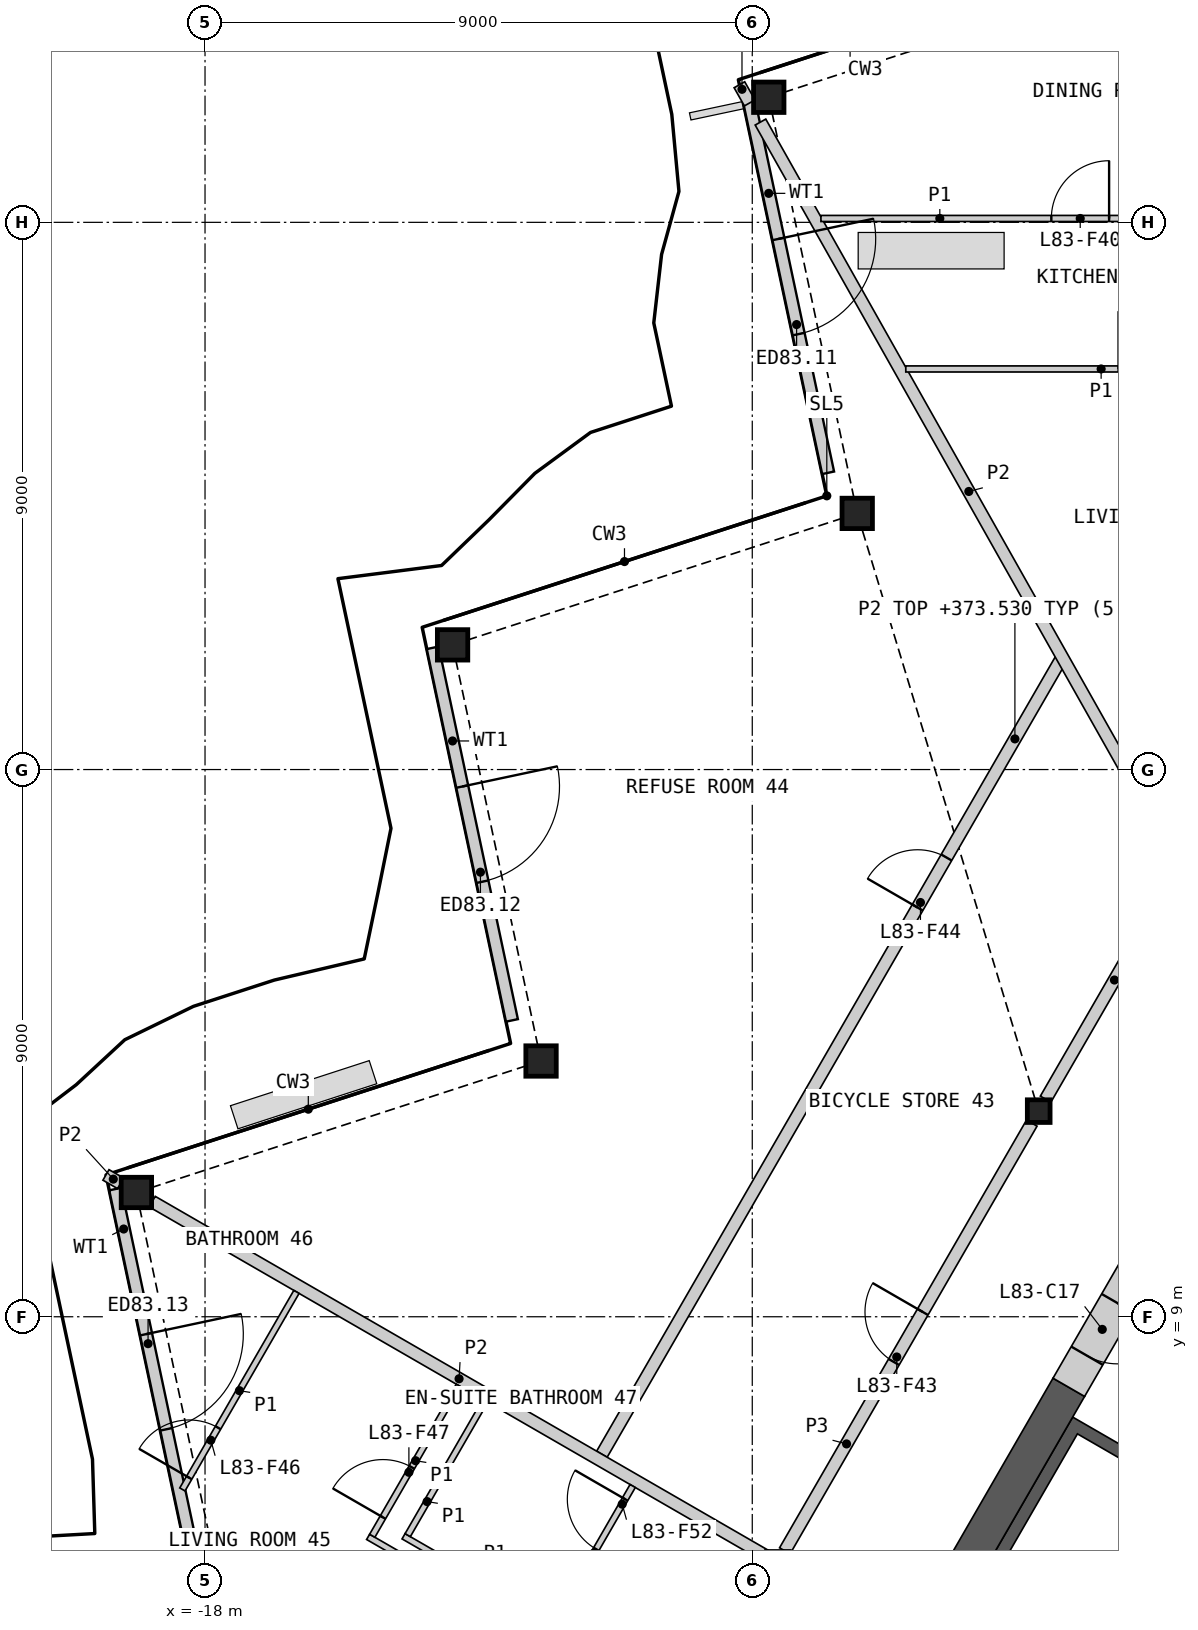
"""IFC4 building model, lengths in metres.
Left out: names, types, materials, properties, quantities, classifications, styles, units other than length and angle.
Written with IfcOpenShell. Run it as: python <this file> out.ifc"""

import sys

from ifc_helpers import new_model, si_unit, direction, frame, frame_2d, origin, origin_2d, place, context, subcontext, project, spatial, polyline, rectangle, hollow_rectangle, i_section, outline, extrude, element, fill, save


model = new_model("IFC4")
c1 = context("Model", 3, precision=1e-05, world=origin(), true_north=direction((0.0, 1.0)))
c2 = subcontext(c1, "Body", "Model", "MODEL_VIEW")
j1 = project(units=[si_unit("LENGTHUNIT", "METRE"), si_unit("PLANEANGLEUNIT", "RADIAN")], contexts=[c1])
p1 = place(None, origin())
s1 = spatial("IfcSite", under=j1, at=p1, CompositionType="ELEMENT")
p2 = place(p1, origin())
s2 = spatial("IfcBuilding", under=s1, at=p2, CompositionType="ELEMENT")
p3 = place(p2, frame((0.0, 0.0, 371.2)))
s3 = spatial("IfcBuildingStorey", under=s2, at=p3, CompositionType="ELEMENT", Elevation=371.2)
for number, where, z_axis, x_axis in (
    (1, (-8.729, 29.057, 0.0), (0.0, 0.0, 1.0), (1.0, 0.0, 0.0)),
    (2, (-7.274, 22.213, 0.0), (0.0, 0.0, 1.0), (1.0, 0.0, 0.0)),
    (3, (-13.929, 20.051, 0.0), (0.0, 0.0, 1.0), (1.0, 0.0, 0.0)),
    (4, (-12.474, 13.206, 0.0), (0.0, 0.0, 1.0), (1.0, 0.0, 0.0)),
    (5, (-19.129, 11.044, 0.0), (0.0, 0.0, 1.0), (1.0, 0.0, 0.0)),
):
    element("IfcColumn", number, at=place(p3, frame(where, z_axis=z_axis, x_axis=x_axis)), inside=s3, PredefinedType="COLUMN", context=c2, shape_type="SweptSolid", body=[
        extrude(hollow_rectangle(XDim=0.5, YDim=0.5, WallThickness=0.03, at=origin_2d()), origin(), (0.0, 0.0, 1.0), 3.4),
    ])
p4 = place(p3, frame((-4.289, 12.382, 0.0), z_axis=(0.0, 0.0, 1.0), x_axis=(1.0, 0.0, 0.0)))
e6 = element("IfcColumn", 6, at=p4, inside=s3, PredefinedType="COLUMN", context=c2, shape_type="SweptSolid", body=[
    extrude(i_section(OverallWidth=0.374, OverallDepth=0.372, WebThickness=0.016, FlangeThickness=0.026, at=origin_2d()), origin(), (0.0, 0.0, 1.0), 3.4),
])
p5 = place(p3, frame((-9.055, 29.009, 0.0), z_axis=(0.0, 0.0, 1.0), x_axis=(0.207926797195, -0.978144389652, 0.0)))
e7 = element("IfcWall", 7, at=p5, inside=s3, PredefinedType="SOLIDWALL", context=c2, shape_type="SweptSolid", body=[
    extrude(rectangle(XDim=6.265, YDim=0.2, at=frame_2d((3.133, 0.0))), origin(), (0.0, 0.0, 1.0), 2.634),
])
p6 = place(p5, frame((2.333, 0.0, 0.0)))
e8 = element("IfcOpeningElement", 8, at=p6, cuts=e7, PredefinedType="OPENING", context=c2, shape_type="SweptSolid", body=[
    extrude(rectangle(XDim=1.6, YDim=2.25, at=frame_2d((0.8, 1.125))), frame((0.0, 0.11, 0.0), z_axis=(0.0, -1.0, 0.0), x_axis=(1.0, 0.0, 0.0)), (0.0, 0.0, 1.0), 0.22),
])
p7 = place(p3, frame((-14.255, 20.002, 0.0), z_axis=(0.0, 0.0, 1.0), x_axis=(0.207926797195, -0.978144389652, 0.0)))
e9 = element("IfcWall", 9, at=p7, inside=s3, PredefinedType="SOLIDWALL", context=c2, shape_type="SweptSolid", body=[
    extrude(rectangle(XDim=6.265, YDim=0.2, at=frame_2d((3.133, 0.0))), origin(), (0.0, 0.0, 1.0), 2.634),
])
p8 = place(p7, frame((2.333, 0.0, 0.0)))
e10 = element("IfcOpeningElement", 10, at=p8, cuts=e9, PredefinedType="OPENING", context=c2, shape_type="SweptSolid", body=[
    extrude(rectangle(XDim=1.6, YDim=2.25, at=frame_2d((0.8, 1.125))), frame((0.0, 0.11, 0.0), z_axis=(0.0, -1.0, 0.0), x_axis=(1.0, 0.0, 0.0)), (0.0, 0.0, 1.0), 0.22),
])
p9 = place(p3, frame((-19.477, 11.1, 0.0), z_axis=(0.0, 0.0, 1.0), x_axis=(0.207910061304, -0.978147947096, 0.0)))
e11 = element("IfcWall", 11, at=p9, inside=s3, PredefinedType="SOLIDWALL", context=c2, shape_type="SweptSolid", body=[
    extrude(rectangle(XDim=6.716, YDim=0.2, at=frame_2d((3.358, 0.0))), origin(), (0.0, 0.0, 1.0), 2.634),
])
p10 = place(p9, frame((2.439, 0.0, 0.0)))
e12 = element("IfcOpeningElement", 12, at=p10, cuts=e11, PredefinedType="OPENING", context=c2, shape_type="SweptSolid", body=[
    extrude(rectangle(XDim=1.6, YDim=2.25, at=frame_2d((0.8, 1.125))), frame((0.0, 0.11, 0.0), z_axis=(0.0, -1.0, 0.0), x_axis=(1.0, 0.0, 0.0)), (0.0, 0.0, 1.0), 0.22),
])
p11 = place(p3, origin())
e13 = element("IfcWall", 13, at=p11, inside=s3, PredefinedType="SHEAR", context=c2, shape_type="SweptSolid", body=[
    extrude(outline(polyline([(-4.96, 0.208), (-7.131, 1.461), (-3.731, 7.35), (-1.561, 6.097), (-1.66, 5.924), (-3.652, 7.074), (-6.852, 1.531), (-4.861, 0.381), (-4.96, 0.208)])), origin(), (0.0, 0.0, 1.0), 3.1),
])
p12 = place(p3, frame((-1.631, 5.776, 0.0), z_axis=(0.0, 0.0, 1.0), x_axis=(-0.499992876559, -0.866029516466, 0.0)))
e14 = element("IfcWall", 14, at=p12, inside=s3, PredefinedType="SOLIDWALL", context=c2, shape_type="SweptSolid", body=[
    extrude(rectangle(XDim=6.486, YDim=0.2, at=frame_2d((3.243, 0.0))), origin(), (0.0, 0.0, 1.0), 3.1),
])
p13 = place(p12, frame((2.637, 0.0, 0.0)))
e15 = element("IfcOpeningElement", 15, at=p13, cuts=e14, PredefinedType="OPENING", context=c2, shape_type="SweptSolid", body=[
    extrude(rectangle(XDim=0.9, YDim=2.1, at=frame_2d((0.45, 1.05))), frame((0.0, 0.11, 0.0), z_axis=(0.0, -1.0, 0.0), x_axis=(1.0, 0.0, 0.0)), (0.0, 0.0, 1.0), 0.22),
])
p14 = place(p3, frame((-3.794, 7.84, 0.0), z_axis=(0.0, 0.0, 1.0), x_axis=(-0.499974747889, -0.866039982607, 0.0)))
e16 = element("IfcWall", 16, at=p14, inside=s3, PredefinedType="SHEAR", context=c2, shape_type="SweptSolid", body=[
    extrude(rectangle(XDim=7.092, YDim=0.6, at=frame_2d((3.546, 0.0))), origin(), (0.0, 0.0, 1.0), 3.1),
])
p15 = place(p3, frame((-2.694, 9.745, 0.0), z_axis=(0.0, 0.0, 1.0), x_axis=(-0.50002983664, -0.866008176907, 0.0)))
e17 = element("IfcWall", 17, at=p15, inside=s3, PredefinedType="SHEAR", context=c2, shape_type="SweptSolid", body=[
    extrude(rectangle(XDim=2.2, YDim=0.6, at=frame_2d((1.1, 0.0))), origin(), (0.0, 0.0, 1.0), 3.1),
])
p16 = place(p15, frame((0.6, 0.0, 0.0)))
e18 = element("IfcOpeningElement", 18, at=p16, cuts=e17, PredefinedType="OPENING", context=c2, shape_type="SweptSolid", body=[
    extrude(rectangle(XDim=1.0, YDim=2.1, at=frame_2d((0.5, 1.05))), frame((0.0, 0.31, 0.0), z_axis=(0.0, -1.0, 0.0), x_axis=(1.0, 0.0, 0.0)), (0.0, 0.0, 1.0), 0.62),
])
p17 = place(p3, frame((-8.465, 5.15, 0.0), z_axis=(0.0, 0.0, 1.0), x_axis=(0.499992155518, 0.866029932751, 0.0)))
e19 = element("IfcWall", 19, at=p17, inside=s3, PredefinedType="PARTITIONING", context=c2, shape_type="SweptSolid", body=[
    extrude(rectangle(XDim=8.123, YDim=0.2, at=frame_2d((4.062, 0.0))), origin(), (0.0, 0.0, 1.0), 3.1),
])
p18 = place(p17, frame((3.587, 0.0, 0.0)))
e20 = element("IfcOpeningElement", 20, at=p18, cuts=e19, PredefinedType="OPENING", context=c2, shape_type="SweptSolid", body=[
    extrude(rectangle(XDim=0.95, YDim=2.1, at=frame_2d((0.475, 1.05))), frame((0.0, 0.11, 0.0), z_axis=(0.0, -1.0, 0.0), x_axis=(1.0, 0.0, 0.0)), (0.0, 0.0, 1.0), 0.22),
])
p19 = place(p3, frame((-4.176, 12.579, 0.0), z_axis=(0.0, 0.0, 1.0), x_axis=(0.499974648164, 0.866040040179, 0.0)))
e21 = element("IfcWall", 21, at=p19, inside=s3, PredefinedType="PARTITIONING", context=c2, shape_type="SweptSolid", body=[
    extrude(rectangle(XDim=4.525, YDim=0.2, at=frame_2d((2.263, 0.0))), origin(), (0.0, 0.0, 1.0), 3.1),
])
p20 = place(p3, frame((-11.473, 6.74, 0.0), z_axis=(0.0, 0.0, 1.0), x_axis=(0.500001082559, 0.866024778768, 0.0)))
e22 = element("IfcWall", 22, at=p20, inside=s3, PredefinedType="PARTITIONING", context=c2, shape_type="SweptSolid", body=[
    extrude(rectangle(XDim=15.094, YDim=0.2, at=frame_2d((7.547, 0.0))), origin(), (0.0, 0.0, 1.0), 2.33),
])
p21 = place(p20, frame((10.383, 0.0, 0.0)))
e23 = element("IfcOpeningElement", 23, at=p21, cuts=e22, PredefinedType="OPENING", context=c2, shape_type="SweptSolid", body=[
    extrude(rectangle(XDim=0.95, YDim=2.1, at=frame_2d((0.475, 1.05))), frame((0.0, 0.11, 0.0), z_axis=(0.0, -1.0, 0.0), x_axis=(1.0, 0.0, 0.0)), (0.0, 0.0, 1.0), 0.22),
])
p22 = place(p3, frame((-8.865, 28.649, 0.0), z_axis=(0.0, 0.0, 1.0), x_axis=(0.491236420263, -0.871026279401, 0.0)))
e24 = element("IfcWall", 24, at=p22, inside=s3, PredefinedType="PARTITIONING", context=c2, shape_type="SweptSolid", body=[
    extrude(rectangle(XDim=13.95, YDim=0.2, at=frame_2d((6.975, 0.0))), origin(), (0.0, 0.0, 1.0), 2.33),
])
p23 = place(p3, frame((-18.869, 10.894, 0.0), z_axis=(0.0, 0.0, 1.0), x_axis=(0.866023724155, -0.500002909193, 0.0)))
e25 = element("IfcWall", 25, at=p23, inside=s3, PredefinedType="PARTITIONING", context=c2, shape_type="SweptSolid", body=[
    extrude(rectangle(XDim=11.655, YDim=0.2, at=frame_2d((5.827, 0.0))), origin(), (0.0, 0.0, 1.0), 2.33),
])
p24 = place(p3, frame((-9.211, 29.263, 0.0), z_axis=(0.0, 0.0, 1.0), x_axis=(0.4910719836, -0.871118996994, 0.0)))
e26 = element("IfcWall", 26, at=p24, inside=s3, PredefinedType="PARTITIONING", context=c2, shape_type="SweptSolid", body=[
    extrude(rectangle(XDim=0.343, YDim=0.2, at=frame_2d((0.171, 0.0))), origin(), (0.0, 0.0, 1.0), 2.33),
])
p25 = place(p3, frame((-19.629, 11.333, 0.0), z_axis=(0.0, 0.0, 1.0), x_axis=(0.866068339032, -0.499925626596, 0.0)))
e27 = element("IfcWall", 27, at=p25, inside=s3, PredefinedType="PARTITIONING", context=c2, shape_type="SweptSolid", body=[
    extrude(rectangle(XDim=0.277, YDim=0.2, at=frame_2d((0.139, 0.0))), origin(), (0.0, 0.0, 1.0), 2.33),
])
p26 = place(p3, frame((-7.871, 27.064, 0.0), z_axis=(0.0, 0.0, 1.0), x_axis=(1.0, 0.0, 0.0)))
e28 = element("IfcWall", 28, at=p26, inside=s3, PredefinedType="PARTITIONING", context=c2, shape_type="SweptSolid", body=[
    extrude(rectangle(XDim=7.821, YDim=0.1, at=frame_2d((3.91, 0.0))), origin(), (0.0, 0.0, 1.0), 2.33),
])
p27 = place(p26, frame((3.789, 0.0, 0.0)))
e29 = element("IfcOpeningElement", 29, at=p27, cuts=e28, PredefinedType="OPENING", context=c2, shape_type="SweptSolid", body=[
    extrude(rectangle(XDim=0.95, YDim=2.1, at=frame_2d((0.475, 1.05))), frame((0.0, 0.06, 0.0), z_axis=(0.0, -1.0, 0.0), x_axis=(1.0, 0.0, 0.0)), (0.0, 0.0, 1.0), 0.12),
])
p28 = place(p3, frame((-6.475, 24.589, 0.0), z_axis=(0.0, 0.0, 1.0), x_axis=(1.0, 0.0, 0.0)))
e30 = element("IfcWall", 30, at=p28, inside=s3, PredefinedType="PARTITIONING", context=c2, shape_type="SweptSolid", body=[
    extrude(rectangle(XDim=6.425, YDim=0.1, at=frame_2d((3.212, 0.0))), origin(), (0.0, 0.0, 1.0), 2.33),
])
p29 = place(p28, frame((3.499, 0.0, 0.0)))
e31 = element("IfcOpeningElement", 31, at=p29, cuts=e30, PredefinedType="OPENING", context=c2, shape_type="SweptSolid", body=[
    extrude(rectangle(XDim=0.95, YDim=2.1, at=frame_2d((0.475, 1.05))), frame((0.0, 0.06, 0.0), z_axis=(0.0, -1.0, 0.0), x_axis=(1.0, 0.0, 0.0)), (0.0, 0.0, 1.0), 0.12),
])
p30 = place(p3, frame((-15.318, 5.38, 0.0), z_axis=(0.0, 0.0, 1.0), x_axis=(0.866035260786, -0.499982926783, 0.0)))
e32 = element("IfcWall", 32, at=p30, inside=s3, PredefinedType="PARTITIONING", context=c2, shape_type="SweptSolid", body=[
    extrude(rectangle(XDim=5.95, YDim=0.1, at=frame_2d((2.975, 0.0))), origin(), (0.0, 0.0, 1.0), 2.33),
])
p31 = place(p3, frame((-18.372, 6.16, 0.0), z_axis=(0.0, 0.0, 1.0), x_axis=(0.499981580887, 0.866036037803, 0.0)))
e33 = element("IfcWall", 33, at=p31, inside=s3, PredefinedType="PARTITIONING", context=c2, shape_type="SweptSolid", body=[
    extrude(rectangle(XDim=3.752, YDim=0.1, at=frame_2d((1.876, 0.0))), origin(), (0.0, 0.0, 1.0), 2.33),
])
p32 = place(p31, frame((0.222, 0.0, 0.0)))
e34 = element("IfcOpeningElement", 34, at=p32, cuts=e33, PredefinedType="OPENING", context=c2, shape_type="SweptSolid", body=[
    extrude(rectangle(XDim=0.95, YDim=2.1, at=frame_2d((0.475, 1.05))), frame((0.0, 0.06, 0.0), z_axis=(0.0, -1.0, 0.0), x_axis=(1.0, 0.0, 0.0)), (0.0, 0.0, 1.0), 0.12),
])
p33 = place(p3, frame((-15.25, 5.398, 0.0), z_axis=(0.0, 0.0, 1.0), x_axis=(0.499935029643, 0.866062911188, 0.0)))
e35 = element("IfcWall", 35, at=p33, inside=s3, PredefinedType="PARTITIONING", context=c2, shape_type="SweptSolid", body=[
    extrude(rectangle(XDim=2.85, YDim=0.1, at=frame_2d((1.425, 0.0))), origin(), (0.0, 0.0, 1.0), 2.33),
])
p34 = place(p33, frame((0.35, 0.0, 0.0)))
e36 = element("IfcOpeningElement", 36, at=p34, cuts=e35, PredefinedType="OPENING", context=c2, shape_type="SweptSolid", body=[
    extrude(rectangle(XDim=0.95, YDim=2.1, at=frame_2d((0.475, 1.05))), frame((0.0, 0.06, 0.0), z_axis=(0.0, -1.0, 0.0), x_axis=(1.0, 0.0, 0.0)), (0.0, 0.0, 1.0), 0.12),
])
p35 = place(p3, frame((-14.735, 5.389, 0.0), z_axis=(0.0, 0.0, 1.0), x_axis=(0.866032775405, -0.499987231761, 0.0)))
e37 = element("IfcWall", 37, at=p35, inside=s3, PredefinedType="PARTITIONING", context=c2, shape_type="SweptSolid", body=[
    extrude(rectangle(XDim=2.9, YDim=0.1, at=frame_2d((1.45, 0.0))), origin(), (0.0, 0.0, 1.0), 2.33),
])
p36 = place(p3, frame((-12.242, 4.008, 0.0), z_axis=(0.0, 0.0, 1.0), x_axis=(0.499948979701, 0.866054858364, 0.0)))
e38 = element("IfcWall", 38, at=p36, inside=s3, PredefinedType="PARTITIONING", context=c2, shape_type="SweptSolid", body=[
    extrude(rectangle(XDim=2.55, YDim=0.1, at=frame_2d((1.275, 0.0))), origin(), (0.0, 0.0, 1.0), 2.33),
])
p37 = place(p36, frame((1.35, 0.0, 0.0)))
e39 = element("IfcOpeningElement", 39, at=p37, cuts=e38, PredefinedType="OPENING", context=c2, shape_type="SweptSolid", body=[
    extrude(rectangle(XDim=0.95, YDim=2.1, at=frame_2d((0.475, 1.05))), frame((0.0, 0.06, 0.0), z_axis=(0.0, -1.0, 0.0), x_axis=(1.0, 0.0, 0.0)), (0.0, 0.0, 1.0), 0.12),
])
p38 = place(p3, frame((-14.667, 5.408, 0.0), z_axis=(0.0, 0.0, 1.0), x_axis=(0.499948979701, 0.866054858364, 0.0)))
e40 = element("IfcWall", 40, at=p38, inside=s3, PredefinedType="PARTITIONING", context=c2, shape_type="SweptSolid", body=[
    extrude(rectangle(XDim=2.55, YDim=0.1, at=frame_2d((1.275, 0.0))), origin(), (0.0, 0.0, 1.0), 2.33),
])
p39 = place(p6, origin())
e41 = element("IfcDoor", 41, at=p39, inside=s3, OperationType="DOUBLE_DOOR_SINGLE_SWING", PredefinedType="DOOR", context=c2, shape_type="SweptSolid", body=[
    extrude(rectangle(XDim=1.6, YDim=2.25, at=frame_2d((0.8, 1.125))), frame((0.0, 0.025, 0.0), z_axis=(0.0, -1.0, 0.0), x_axis=(1.0, 0.0, 0.0)), (0.0, 0.0, 1.0), 0.05),
])
fill(e8, e41)
p40 = place(p8, origin())
e42 = element("IfcDoor", 42, at=p40, inside=s3, OperationType="DOUBLE_DOOR_SINGLE_SWING", PredefinedType="DOOR", context=c2, shape_type="SweptSolid", body=[
    extrude(rectangle(XDim=1.6, YDim=2.25, at=frame_2d((0.8, 1.125))), frame((0.0, 0.025, 0.0), z_axis=(0.0, -1.0, 0.0), x_axis=(1.0, 0.0, 0.0)), (0.0, 0.0, 1.0), 0.05),
])
fill(e10, e42)
p41 = place(p10, origin())
e43 = element("IfcDoor", 43, at=p41, inside=s3, OperationType="DOUBLE_DOOR_SINGLE_SWING", PredefinedType="DOOR", context=c2, shape_type="SweptSolid", body=[
    extrude(rectangle(XDim=1.6, YDim=2.25, at=frame_2d((0.8, 1.125))), frame((0.0, 0.025, 0.0), z_axis=(0.0, -1.0, 0.0), x_axis=(1.0, 0.0, 0.0)), (0.0, 0.0, 1.0), 0.05),
])
fill(e12, e43)
p42 = place(p16, origin())
e44 = element("IfcDoor", 44, at=p42, inside=s3, OperationType="SINGLE_SWING_LEFT", PredefinedType="DOOR", context=c2, shape_type="SweptSolid", body=[
    extrude(rectangle(XDim=1.0, YDim=2.1, at=frame_2d((0.5, 1.05))), frame((0.0, 0.055, 0.0), z_axis=(0.0, -1.0, 0.0), x_axis=(1.0, 0.0, 0.0)), (0.0, 0.0, 1.0), 0.05),
])
fill(e18, e44)
p43 = place(p27, origin())
e45 = element("IfcDoor", 45, at=p43, inside=s3, OperationType="SINGLE_SWING_RIGHT", PredefinedType="DOOR", context=c2, shape_type="SweptSolid", body=[
    extrude(rectangle(XDim=0.95, YDim=2.1, at=frame_2d((0.475, 1.05))), frame((0.0, 0.025, 0.0), z_axis=(0.0, -1.0, 0.0), x_axis=(1.0, 0.0, 0.0)), (0.0, 0.0, 1.0), 0.05),
])
fill(e29, e45)
p44 = place(p18, origin())
e46 = element("IfcDoor", 46, at=p44, inside=s3, OperationType="SINGLE_SWING_RIGHT", PredefinedType="DOOR", context=c2, shape_type="SweptSolid", body=[
    extrude(rectangle(XDim=0.95, YDim=2.1, at=frame_2d((0.475, 1.05))), frame((0.0, 0.025, 0.0), z_axis=(0.0, -1.0, 0.0), x_axis=(1.0, 0.0, 0.0)), (0.0, 0.0, 1.0), 0.05),
])
fill(e20, e46)
p45 = place(p21, origin())
e47 = element("IfcDoor", 47, at=p45, inside=s3, OperationType="SINGLE_SWING_LEFT", PredefinedType="DOOR", context=c2, shape_type="SweptSolid", body=[
    extrude(rectangle(XDim=0.95, YDim=2.1, at=frame_2d((0.475, 1.05))), frame((0.0, 0.025, 0.0), z_axis=(0.0, -1.0, 0.0), x_axis=(1.0, 0.0, 0.0)), (0.0, 0.0, 1.0), 0.05),
])
fill(e23, e47)
p46 = place(p32, origin())
e48 = element("IfcDoor", 48, at=p46, inside=s3, OperationType="SINGLE_SWING_LEFT", PredefinedType="DOOR", context=c2, shape_type="SweptSolid", body=[
    extrude(rectangle(XDim=0.95, YDim=2.1, at=frame_2d((0.475, 1.05))), frame((0.0, 0.025, 0.0), z_axis=(0.0, -1.0, 0.0), x_axis=(1.0, 0.0, 0.0)), (0.0, 0.0, 1.0), 0.05),
])
fill(e34, e48)
p47 = place(p34, origin())
e49 = element("IfcDoor", 49, at=p47, inside=s3, OperationType="SINGLE_SWING_LEFT", PredefinedType="DOOR", context=c2, shape_type="SweptSolid", body=[
    extrude(rectangle(XDim=0.95, YDim=2.1, at=frame_2d((0.475, 1.05))), frame((0.0, 0.025, 0.0), z_axis=(0.0, -1.0, 0.0), x_axis=(1.0, 0.0, 0.0)), (0.0, 0.0, 1.0), 0.05),
])
fill(e36, e49)
p48 = place(p37, origin())
e50 = element("IfcDoor", 50, at=p48, inside=s3, OperationType="SINGLE_SWING_RIGHT", PredefinedType="DOOR", context=c2, shape_type="SweptSolid", body=[
    extrude(rectangle(XDim=0.95, YDim=2.1, at=frame_2d((0.475, 1.05))), frame((0.0, 0.025, 0.0), z_axis=(0.0, -1.0, 0.0), x_axis=(1.0, 0.0, 0.0)), (0.0, 0.0, 1.0), 0.05),
])
fill(e39, e50)
save(model, sys.argv[1])
